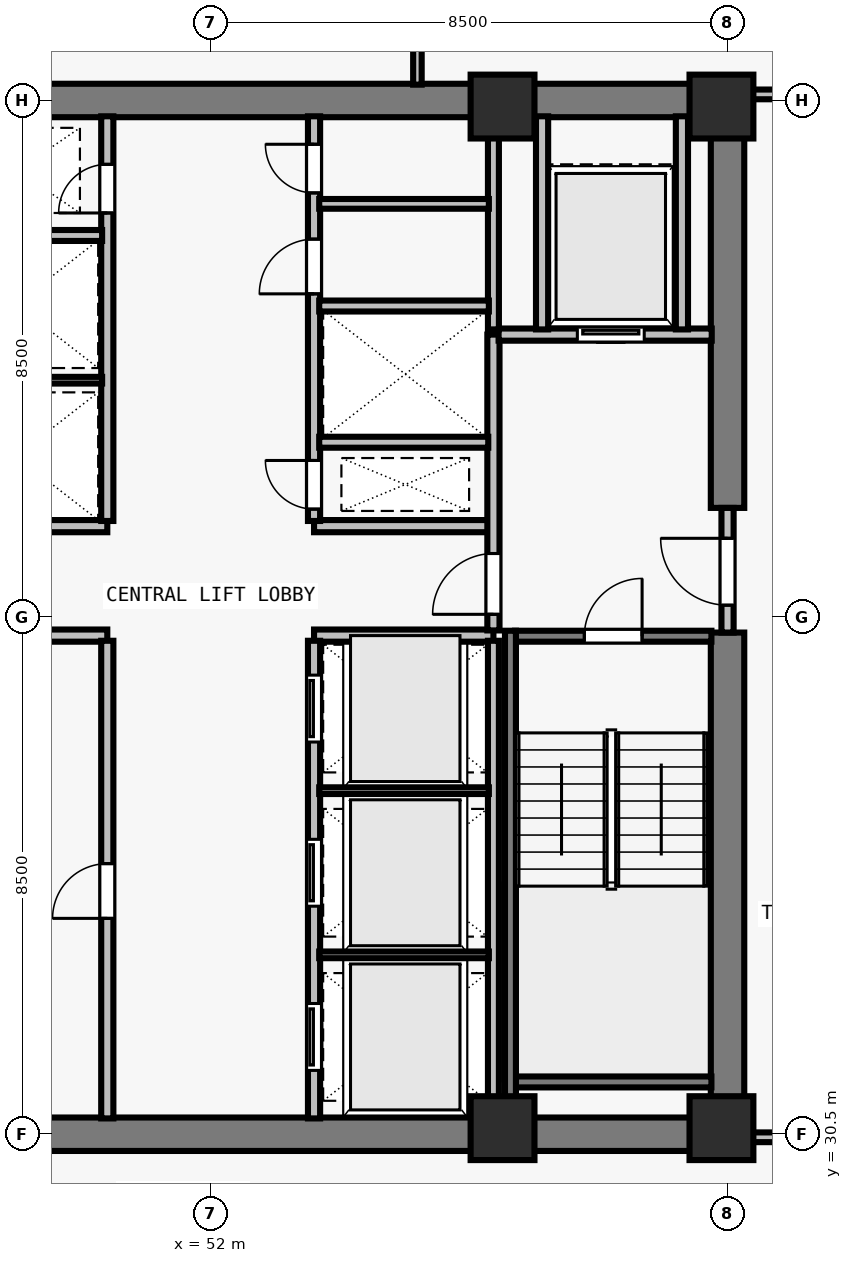
"""IFC4 building model, lengths in metres.
Left out: names, types, materials, properties, quantities, classifications, styles, units other than length and angle.
Written with IfcOpenShell. Run it as: python <this file> out.ifc"""

import sys

from ifc_helpers import new_model, si_unit, direction, frame, frame_2d, origin, origin_2d, place, context, subcontext, project, spatial, rectangle, extrude, element, fill, save


model = new_model("IFC4")
c1 = context("Model", 3, precision=1e-05, world=origin(), true_north=direction((0.0, 1.0)))
c2 = subcontext(c1, "Body", "Model", "MODEL_VIEW")
j1 = project(units=[si_unit("LENGTHUNIT", "METRE"), si_unit("PLANEANGLEUNIT", "RADIAN")], contexts=[c1])
p1 = place(None, origin())
s1 = spatial("IfcSite", under=j1, at=p1, CompositionType="ELEMENT")
p2 = place(p1, origin())
s2 = spatial("IfcBuilding", under=s1, at=p2, CompositionType="ELEMENT")
p3 = place(p2, frame((0.0, 0.0, 176.0)))
s3 = spatial("IfcBuildingStorey", under=s2, at=p3, CompositionType="ELEMENT", Elevation=176.0)
for number, where, z_axis, x_axis in (
    (1, (56.8, 30.6, 0.0), (0.0, 0.0, 1.0), (1.0, 0.0, 0.0)),
    (2, (60.4, 30.6, 0.0), (0.0, 0.0, 1.0), (1.0, 0.0, 0.0)),
    (3, (56.8, 47.4, 0.0), (0.0, 0.0, 1.0), (1.0, 0.0, 0.0)),
    (4, (60.4, 47.4, 0.0), (0.0, 0.0, 1.0), (1.0, 0.0, 0.0)),
):
    element("IfcColumn", number, at=place(p3, frame(where, z_axis=z_axis, x_axis=x_axis)), inside=s3, PredefinedType="COLUMN", context=c2, shape_type="SweptSolid", body=[
        extrude(rectangle(XDim=1.05, YDim=1.05, at=origin_2d()), origin(), (0.0, 0.0, 1.0), 3.5),
    ])
for number, where, z_axis, x_axis in (
    (5, (43.225, 30.5, 0.0), (0.0, 0.0, 1.0), (1.0, 0.0, 0.0)),
    (6, (43.225, 47.5, 0.0), (0.0, 0.0, 1.0), (1.0, 0.0, 0.0)),
):
    element("IfcWall", number, at=place(p3, frame(where, z_axis=z_axis, x_axis=x_axis)), inside=s3, PredefinedType="SHEAR", context=c2, shape_type="SweptSolid", body=[
        extrude(rectangle(XDim=17.55, YDim=0.55, at=frame_2d((8.775, 0.0))), origin(), (0.0, 0.0, 1.0), 3.28),
    ])
p4 = place(p3, frame((60.5, 30.765, 0.0), z_axis=(0.0, 0.0, 1.0), x_axis=(0.0, 1.0, 0.0)))
e7 = element("IfcWall", 7, at=p4, inside=s3, PredefinedType="SHEAR", context=c2, shape_type="SweptSolid", body=[
    extrude(rectangle(XDim=7.985, YDim=0.55, at=frame_2d((3.993, 0.0))), origin(), (0.0, 0.0, 1.0), 3.28),
])
p5 = place(p3, frame((60.5, 40.8, 0.0), z_axis=(0.0, 0.0, 1.0), x_axis=(0.0, 1.0, 0.0)))
e8 = element("IfcWall", 8, at=p5, inside=s3, PredefinedType="SHEAR", context=c2, shape_type="SweptSolid", body=[
    extrude(rectangle(XDim=6.435, YDim=0.55, at=frame_2d((3.218, 0.0))), origin(), (0.0, 0.0, 1.0), 3.28),
])
for number, where, z_axis, x_axis in (
    (9, (47.35, 38.7, 0.0), (0.0, 0.0, 1.0), (1.0, 0.0, 0.0)),
    (10, (47.35, 40.5, 0.0), (0.0, 0.0, 1.0), (1.0, 0.0, 0.0)),
    (11, (53.7, 38.7, 0.0), (0.0, 0.0, 1.0), (1.0, 0.0, 0.0)),
    (12, (53.7, 40.5, 0.0), (0.0, 0.0, 1.0), (1.0, 0.0, 0.0)),
):
    element("IfcWall", number, at=place(p3, frame(where, z_axis=z_axis, x_axis=x_axis)), inside=s3, PredefinedType="SOLIDWALL", context=c2, shape_type="SweptSolid", body=[
        extrude(rectangle(XDim=2.95, YDim=0.2, at=frame_2d((1.475, 0.0))), origin(), (0.0, 0.0, 1.0), 3.28),
    ])
p6 = place(p3, frame((50.3, 30.76, 0.0), z_axis=(0.0, 0.0, 1.0), x_axis=(0.0, 1.0, 0.0)))
e13 = element("IfcWall", 13, at=p6, inside=s3, PredefinedType="SOLIDWALL", context=c2, shape_type="SweptSolid", body=[
    extrude(rectangle(XDim=7.855, YDim=0.2, at=frame_2d((3.927, 0.0))), origin(), (0.0, 0.0, 1.0), 3.28),
])
p7 = place(p6, frame((3.29, 0.0, 0.0)))
e14 = element("IfcOpeningElement", 14, at=p7, cuts=e13, PredefinedType="OPENING", context=c2, shape_type="SweptSolid", body=[
    extrude(rectangle(XDim=0.9, YDim=2.12, at=frame_2d((0.45, 1.06))), frame((0.0, 0.11, 0.0), z_axis=(0.0, -1.0, 0.0), x_axis=(1.0, 0.0, 0.0)), (0.0, 0.0, 1.0), 0.22),
])
p8 = place(p3, frame((53.7, 30.76, 0.0), z_axis=(0.0, 0.0, 1.0), x_axis=(0.0, 1.0, 0.0)))
e15 = element("IfcWall", 15, at=p8, inside=s3, PredefinedType="SOLIDWALL", context=c2, shape_type="SweptSolid", body=[
    extrude(rectangle(XDim=7.855, YDim=0.2, at=frame_2d((3.927, 0.0))), origin(), (0.0, 0.0, 1.0), 3.28),
])
p9 = place(p8, frame((0.79, 0.0, 0.0)))
e16 = element("IfcOpeningElement", 16, at=p9, cuts=e15, PredefinedType="OPENING", context=c2, shape_type="SweptSolid", body=[
    extrude(rectangle(XDim=1.1, YDim=2.2, at=frame_2d((0.55, 1.1))), frame((0.0, 0.11, 0.0), z_axis=(0.0, -1.0, 0.0), x_axis=(1.0, 0.0, 0.0)), (0.0, 0.0, 1.0), 0.22),
])
p10 = place(p8, frame((3.49, 0.0, 0.0)))
e17 = element("IfcOpeningElement", 17, at=p10, cuts=e15, PredefinedType="OPENING", context=c2, shape_type="SweptSolid", body=[
    extrude(rectangle(XDim=1.1, YDim=2.2, at=frame_2d((0.55, 1.1))), frame((0.0, 0.11, 0.0), z_axis=(0.0, -1.0, 0.0), x_axis=(1.0, 0.0, 0.0)), (0.0, 0.0, 1.0), 0.22),
])
p11 = place(p8, frame((6.19, 0.0, 0.0)))
e18 = element("IfcOpeningElement", 18, at=p11, cuts=e15, PredefinedType="OPENING", context=c2, shape_type="SweptSolid", body=[
    extrude(rectangle(XDim=1.1, YDim=2.2, at=frame_2d((0.55, 1.1))), frame((0.0, 0.11, 0.0), z_axis=(0.0, -1.0, 0.0), x_axis=(1.0, 0.0, 0.0)), (0.0, 0.0, 1.0), 0.22),
])
p12 = place(p3, frame((50.3, 40.585, 0.0), z_axis=(0.0, 0.0, 1.0), x_axis=(0.0, 1.0, 0.0)))
e19 = element("IfcWall", 19, at=p12, inside=s3, PredefinedType="SOLIDWALL", context=c2, shape_type="SweptSolid", body=[
    extrude(rectangle(XDim=6.655, YDim=0.2, at=frame_2d((3.328, 0.0))), origin(), (0.0, 0.0, 1.0), 3.28),
])
p13 = place(p12, frame((5.065, 0.0, 0.0)))
e20 = element("IfcOpeningElement", 20, at=p13, cuts=e19, PredefinedType="OPENING", context=c2, shape_type="SweptSolid", body=[
    extrude(rectangle(XDim=0.8, YDim=2.08, at=frame_2d((0.4, 1.04))), frame((0.0, 0.11, 0.0), z_axis=(0.0, -1.0, 0.0), x_axis=(1.0, 0.0, 0.0)), (0.0, 0.0, 1.0), 0.22),
])
p14 = place(p3, frame((53.7, 40.585, 0.0), z_axis=(0.0, 0.0, 1.0), x_axis=(0.0, 1.0, 0.0)))
e21 = element("IfcWall", 21, at=p14, inside=s3, PredefinedType="SOLIDWALL", context=c2, shape_type="SweptSolid", body=[
    extrude(rectangle(XDim=6.655, YDim=0.2, at=frame_2d((3.328, 0.0))), origin(), (0.0, 0.0, 1.0), 3.28),
])
p15 = place(p14, frame((0.195, 0.0, 0.0)))
e22 = element("IfcOpeningElement", 22, at=p15, cuts=e21, PredefinedType="OPENING", context=c2, shape_type="SweptSolid", body=[
    extrude(rectangle(XDim=0.8, YDim=2.08, at=frame_2d((0.4, 1.04))), frame((0.0, 0.11, 0.0), z_axis=(0.0, -1.0, 0.0), x_axis=(1.0, 0.0, 0.0)), (0.0, 0.0, 1.0), 0.22),
])
p16 = place(p14, frame((3.735, 0.0, 0.0)))
e23 = element("IfcOpeningElement", 23, at=p16, cuts=e21, PredefinedType="OPENING", context=c2, shape_type="SweptSolid", body=[
    extrude(rectangle(XDim=0.9, YDim=2.12, at=frame_2d((0.45, 1.06))), frame((0.0, 0.11, 0.0), z_axis=(0.0, -1.0, 0.0), x_axis=(1.0, 0.0, 0.0)), (0.0, 0.0, 1.0), 0.22),
])
p17 = place(p14, frame((5.395, 0.0, 0.0)))
e24 = element("IfcOpeningElement", 24, at=p17, cuts=e21, PredefinedType="OPENING", context=c2, shape_type="SweptSolid", body=[
    extrude(rectangle(XDim=0.8, YDim=2.1, at=frame_2d((0.4, 1.05))), frame((0.0, 0.11, 0.0), z_axis=(0.0, -1.0, 0.0), x_axis=(1.0, 0.0, 0.0)), (0.0, 0.0, 1.0), 0.22),
])
p18 = place(p3, frame((60.5, 38.75, 0.0), z_axis=(0.0, 0.0, 1.0), x_axis=(0.0, 1.0, 0.0)))
e25 = element("IfcWall", 25, at=p18, inside=s3, PredefinedType="SOLIDWALL", context=c2, shape_type="SweptSolid", body=[
    extrude(rectangle(XDim=2.05, YDim=0.2, at=frame_2d((1.025, 0.0))), origin(), (0.0, 0.0, 1.0), 3.28),
])
p19 = place(p18, frame((0.45, 0.0, 0.0)))
e26 = element("IfcOpeningElement", 26, at=p19, cuts=e25, PredefinedType="OPENING", context=c2, shape_type="SweptSolid", body=[
    extrude(rectangle(XDim=1.1, YDim=2.15, at=frame_2d((0.55, 1.075))), frame((0.0, 0.11, 0.0), z_axis=(0.0, -1.0, 0.0), x_axis=(1.0, 0.0, 0.0)), (0.0, 0.0, 1.0), 0.22),
])
p20 = place(p3, frame((56.65, 38.785, 0.0), z_axis=(0.0, 0.0, 1.0), x_axis=(0.0, 1.0, 0.0)))
e27 = element("IfcWall", 27, at=p20, inside=s3, PredefinedType="SOLIDWALL", context=c2, shape_type="SweptSolid", body=[
    extrude(rectangle(XDim=4.865, YDim=0.2, at=frame_2d((2.433, 0.0))), origin(), (0.0, 0.0, 1.0), 3.28),
])
p21 = place(p20, frame((0.265, 0.0, 0.0)))
e28 = element("IfcOpeningElement", 28, at=p21, cuts=e27, PredefinedType="OPENING", context=c2, shape_type="SweptSolid", body=[
    extrude(rectangle(XDim=1.0, YDim=2.15, at=frame_2d((0.5, 1.075))), frame((0.0, 0.11, 0.0), z_axis=(0.0, -1.0, 0.0), x_axis=(1.0, 0.0, 0.0)), (0.0, 0.0, 1.0), 0.22),
])
p22 = place(p3, frame((56.735, 43.65, 0.0), z_axis=(0.0, 0.0, 1.0), x_axis=(1.0, 0.0, 0.0)))
e29 = element("IfcWall", 29, at=p22, inside=s3, PredefinedType="SOLIDWALL", context=c2, shape_type="SweptSolid", body=[
    extrude(rectangle(XDim=3.505, YDim=0.2, at=frame_2d((1.752, 0.0))), origin(), (0.0, 0.0, 1.0), 3.28),
])
p23 = place(p22, frame((1.295, 0.0, 0.0)))
e30 = element("IfcOpeningElement", 30, at=p23, cuts=e29, PredefinedType="OPENING", context=c2, shape_type="SweptSolid", body=[
    extrude(rectangle(XDim=1.1, YDim=2.2, at=frame_2d((0.55, 1.1))), frame((0.0, 0.11, 0.0), z_axis=(0.0, -1.0, 0.0), x_axis=(1.0, 0.0, 0.0)), (0.0, 0.0, 1.0), 0.22),
])
for number, where, z_axis, x_axis in (
    (31, (57.45, 43.735, 0.0), (0.0, 0.0, 1.0), (0.0, 1.0, 0.0)),
    (32, (59.75, 43.735, 0.0), (0.0, 0.0, 1.0), (0.0, 1.0, 0.0)),
):
    element("IfcWall", number, at=place(p3, frame(where, z_axis=z_axis, x_axis=x_axis)), inside=s3, PredefinedType="SOLIDWALL", context=c2, shape_type="SweptSolid", body=[
        extrude(rectangle(XDim=3.505, YDim=0.2, at=frame_2d((1.752, 0.0))), origin(), (0.0, 0.0, 1.0), 3.28),
    ])
p24 = place(p3, frame((56.65, 30.76, 0.0), z_axis=(0.0, 0.0, 1.0), x_axis=(0.0, 1.0, 0.0)))
e33 = element("IfcWall", 33, at=p24, inside=s3, PredefinedType="SOLIDWALL", context=c2, shape_type="SweptSolid", body=[
    extrude(rectangle(XDim=7.855, YDim=0.18, at=frame_2d((3.927, 0.0))), origin(), (0.0, 0.0, 1.0), 3.28),
])
for number, where, z_axis, x_axis in (
    (34, (53.785, 33.45, 0.0), (0.0, 0.0, 1.0), (1.0, 0.0, 0.0)),
    (35, (53.785, 36.15, 0.0), (0.0, 0.0, 1.0), (1.0, 0.0, 0.0)),
):
    element("IfcWall", number, at=place(p3, frame(where, z_axis=z_axis, x_axis=x_axis)), inside=s3, PredefinedType="PARTITIONING", context=c2, shape_type="SweptSolid", body=[
        extrude(rectangle(XDim=2.79, YDim=0.11, at=frame_2d((1.395, 0.0))), origin(), (0.0, 0.0, 1.0), 3.28),
    ])
p25 = place(p3, frame((47.435, 42.9, 0.0), z_axis=(0.0, 0.0, 1.0), x_axis=(1.0, 0.0, 0.0)))
e36 = element("IfcWall", 36, at=p25, inside=s3, PredefinedType="PARTITIONING", context=c2, shape_type="SweptSolid", body=[
    extrude(rectangle(XDim=2.78, YDim=0.11, at=frame_2d((1.39, 0.0))), origin(), (0.0, 0.0, 1.0), 3.28),
])
p26 = place(p3, frame((47.425, 45.28, 0.0), z_axis=(0.0, 0.0, 1.0), x_axis=(1.0, 0.0, 0.0)))
e37 = element("IfcWall", 37, at=p26, inside=s3, PredefinedType="SOLIDWALL", context=c2, shape_type="SweptSolid", body=[
    extrude(rectangle(XDim=2.79, YDim=0.18, at=frame_2d((1.395, 0.0))), origin(), (0.0, 0.0, 1.0), 3.28),
])
p27 = place(p3, frame((56.65, 43.735, 0.0), z_axis=(0.0, 0.0, 1.0), x_axis=(0.0, 1.0, 0.0)))
e38 = element("IfcWall", 38, at=p27, inside=s3, PredefinedType="SOLIDWALL", context=c2, shape_type="SweptSolid", body=[
    extrude(rectangle(XDim=3.505, YDim=0.18, at=frame_2d((1.752, 0.0))), origin(), (0.0, 0.0, 1.0), 3.28),
])
p28 = place(p3, frame((53.785, 41.88, 0.0), z_axis=(0.0, 0.0, 1.0), x_axis=(1.0, 0.0, 0.0)))
e39 = element("IfcWall", 39, at=p28, inside=s3, PredefinedType="SOLIDWALL", context=c2, shape_type="SweptSolid", body=[
    extrude(rectangle(XDim=2.78, YDim=0.18, at=frame_2d((1.39, 0.0))), origin(), (0.0, 0.0, 1.0), 3.28),
])
p29 = place(p3, frame((53.785, 44.12, 0.0), z_axis=(0.0, 0.0, 1.0), x_axis=(1.0, 0.0, 0.0)))
e40 = element("IfcWall", 40, at=p29, inside=s3, PredefinedType="SOLIDWALL", context=c2, shape_type="SweptSolid", body=[
    extrude(rectangle(XDim=2.79, YDim=0.18, at=frame_2d((1.395, 0.0))), origin(), (0.0, 0.0, 1.0), 3.28),
])
p30 = place(p3, frame((53.785, 45.8, 0.0), z_axis=(0.0, 0.0, 1.0), x_axis=(1.0, 0.0, 0.0)))
e41 = element("IfcWall", 41, at=p30, inside=s3, PredefinedType="PARTITIONING", context=c2, shape_type="SweptSolid", body=[
    extrude(rectangle(XDim=2.79, YDim=0.16, at=frame_2d((1.395, 0.0))), origin(), (0.0, 0.0, 1.0), 3.28),
])
p31 = place(p3, frame((60.765, 30.45, 0.0), z_axis=(0.0, 0.0, 1.0), x_axis=(1.0, 0.0, 0.0)))
e42 = element("IfcWall", 42, at=p31, inside=s3, PredefinedType="PARTITIONING", context=c2, shape_type="SweptSolid", body=[
    extrude(rectangle(XDim=3.235, YDim=0.16, at=frame_2d((1.618, 0.0))), origin(), (0.0, 0.0, 1.0), 3.28),
])
p32 = place(p3, frame((60.765, 47.6, 0.0), z_axis=(0.0, 0.0, 1.0), x_axis=(1.0, 0.0, 0.0)))
e43 = element("IfcWall", 43, at=p32, inside=s3, PredefinedType="PARTITIONING", context=c2, shape_type="SweptSolid", body=[
    extrude(rectangle(XDim=3.17, YDim=0.16, at=frame_2d((1.585, 0.0))), origin(), (0.0, 0.0, 1.0), 3.28),
])
p33 = place(p3, frame((55.4, 47.76, 0.0), z_axis=(0.0, 0.0, 1.0), x_axis=(0.0, 1.0, 0.0)))
e44 = element("IfcWall", 44, at=p33, inside=s3, PredefinedType="PARTITIONING", context=c2, shape_type="SweptSolid", body=[
    extrude(rectangle(XDim=14.915, YDim=0.14, at=frame_2d((7.458, 0.0))), origin(), (0.0, 0.0, 1.0), 2.896),
])
p34 = place(p3, frame((57.005, 38.69, 0.0), z_axis=(0.0, 0.0, 1.0), x_axis=(1.0, 0.0, 0.0)))
e45 = element("IfcWall", 45, at=p34, inside=s3, PredefinedType="SOLIDWALL", context=c2, shape_type="SweptSolid", body=[
    extrude(rectangle(XDim=3.23, YDim=0.18, at=frame_2d((1.615, 0.0))), origin(), (0.0, 0.0, 1.0), 3.28),
])
p35 = place(p34, frame((1.14, 0.0, 0.0)))
e46 = element("IfcOpeningElement", 46, at=p35, cuts=e45, PredefinedType="OPENING", context=c2, shape_type="SweptSolid", body=[
    extrude(rectangle(XDim=0.95, YDim=2.15, at=frame_2d((0.475, 1.075))), frame((0.0, 0.1, 0.0), z_axis=(0.0, -1.0, 0.0), x_axis=(1.0, 0.0, 0.0)), (0.0, 0.0, 1.0), 0.2),
])
p36 = place(p3, frame((57.005, 31.36, 0.0), z_axis=(0.0, 0.0, 1.0), x_axis=(1.0, 0.0, 0.0)))
e47 = element("IfcWall", 47, at=p36, inside=s3, PredefinedType="SOLIDWALL", context=c2, shape_type="SweptSolid", body=[
    extrude(rectangle(XDim=3.23, YDim=0.18, at=frame_2d((1.615, 0.0))), origin(), (0.0, 0.0, 1.0), 3.28),
])
p37 = place(p3, frame((56.93, 38.78, 0.0), z_axis=(0.0, 0.0, 1.0), x_axis=(0.0, -1.0, 0.0)))
e48 = element("IfcWall", 48, at=p37, inside=s3, PredefinedType="SOLIDWALL", context=c2, shape_type="SweptSolid", body=[
    extrude(rectangle(XDim=8.017, YDim=0.18, at=frame_2d((4.009, 0.0))), origin(), (0.0, 0.0, 1.0), 3.28),
])
p38 = place(p19, origin())
e49 = element("IfcDoor", 49, at=p38, inside=s3, OperationType="SINGLE_SWING_RIGHT", PredefinedType="DOOR", context=c2, shape_type="SweptSolid", body=[
    extrude(rectangle(XDim=1.1, YDim=2.15, at=frame_2d((0.55, 1.075))), frame((0.0, 0.025, 0.0), z_axis=(0.0, -1.0, 0.0), x_axis=(1.0, 0.0, 0.0)), (0.0, 0.0, 1.0), 0.05),
])
fill(e26, e49)
p39 = place(p21, origin())
e50 = element("IfcDoor", 50, at=p39, inside=s3, OperationType="SINGLE_SWING_LEFT", PredefinedType="DOOR", context=c2, shape_type="SweptSolid", body=[
    extrude(rectangle(XDim=1.0, YDim=2.15, at=frame_2d((0.5, 1.075))), frame((0.0, 0.025, 0.0), z_axis=(0.0, -1.0, 0.0), x_axis=(1.0, 0.0, 0.0)), (0.0, 0.0, 1.0), 0.05),
])
fill(e28, e50)
p40 = place(p23, origin())
e51 = element("IfcDoor", 51, at=p40, inside=s3, OperationType="SLIDING_TO_LEFT", PredefinedType="DOOR", context=c2, shape_type="SweptSolid", body=[
    extrude(rectangle(XDim=1.1, YDim=2.2, at=frame_2d((0.55, 1.1))), frame((0.0, 0.025, 0.0), z_axis=(0.0, -1.0, 0.0), x_axis=(1.0, 0.0, 0.0)), (0.0, 0.0, 1.0), 0.05),
])
fill(e30, e51)
p41 = place(p7, origin())
e52 = element("IfcDoor", 52, at=p41, inside=s3, OperationType="SINGLE_SWING_LEFT", PredefinedType="DOOR", context=c2, shape_type="SweptSolid", body=[
    extrude(rectangle(XDim=0.9, YDim=2.12, at=frame_2d((0.45, 1.06))), frame((0.0, 0.025, 0.0), z_axis=(0.0, -1.0, 0.0), x_axis=(1.0, 0.0, 0.0)), (0.0, 0.0, 1.0), 0.05),
])
fill(e14, e52)
p42 = place(p9, origin())
e53 = element("IfcDoor", 53, at=p42, inside=s3, OperationType="SLIDING_TO_LEFT", PredefinedType="DOOR", context=c2, shape_type="SweptSolid", body=[
    extrude(rectangle(XDim=1.1, YDim=2.2, at=frame_2d((0.55, 1.1))), frame((0.0, 0.025, 0.0), z_axis=(0.0, -1.0, 0.0), x_axis=(1.0, 0.0, 0.0)), (0.0, 0.0, 1.0), 0.05),
])
fill(e16, e53)
p43 = place(p10, origin())
e54 = element("IfcDoor", 54, at=p43, inside=s3, OperationType="SLIDING_TO_LEFT", PredefinedType="DOOR", context=c2, shape_type="SweptSolid", body=[
    extrude(rectangle(XDim=1.1, YDim=2.2, at=frame_2d((0.55, 1.1))), frame((0.0, 0.025, 0.0), z_axis=(0.0, -1.0, 0.0), x_axis=(1.0, 0.0, 0.0)), (0.0, 0.0, 1.0), 0.05),
])
fill(e17, e54)
p44 = place(p11, origin())
e55 = element("IfcDoor", 55, at=p44, inside=s3, OperationType="SLIDING_TO_LEFT", PredefinedType="DOOR", context=c2, shape_type="SweptSolid", body=[
    extrude(rectangle(XDim=1.1, YDim=2.2, at=frame_2d((0.55, 1.1))), frame((0.0, 0.025, 0.0), z_axis=(0.0, -1.0, 0.0), x_axis=(1.0, 0.0, 0.0)), (0.0, 0.0, 1.0), 0.05),
])
fill(e18, e55)
p45 = place(p13, origin())
e56 = element("IfcDoor", 56, at=p45, inside=s3, OperationType="SINGLE_SWING_LEFT", PredefinedType="DOOR", context=c2, shape_type="SweptSolid", body=[
    extrude(rectangle(XDim=0.8, YDim=2.08, at=frame_2d((0.4, 1.04))), frame((0.0, 0.025, 0.0), z_axis=(0.0, -1.0, 0.0), x_axis=(1.0, 0.0, 0.0)), (0.0, 0.0, 1.0), 0.05),
])
fill(e20, e56)
p46 = place(p15, origin())
e57 = element("IfcDoor", 57, at=p46, inside=s3, OperationType="SINGLE_SWING_RIGHT", PredefinedType="DOOR", context=c2, shape_type="SweptSolid", body=[
    extrude(rectangle(XDim=0.8, YDim=2.08, at=frame_2d((0.4, 1.04))), frame((0.0, 0.025, 0.0), z_axis=(0.0, -1.0, 0.0), x_axis=(1.0, 0.0, 0.0)), (0.0, 0.0, 1.0), 0.05),
])
fill(e22, e57)
p47 = place(p16, origin())
e58 = element("IfcDoor", 58, at=p47, inside=s3, OperationType="SINGLE_SWING_LEFT", PredefinedType="DOOR", context=c2, shape_type="SweptSolid", body=[
    extrude(rectangle(XDim=0.9, YDim=2.12, at=frame_2d((0.45, 1.06))), frame((0.0, 0.025, 0.0), z_axis=(0.0, -1.0, 0.0), x_axis=(1.0, 0.0, 0.0)), (0.0, 0.0, 1.0), 0.05),
])
fill(e23, e58)
p48 = place(p17, origin())
e59 = element("IfcDoor", 59, at=p48, inside=s3, OperationType="SINGLE_SWING_RIGHT", PredefinedType="DOOR", context=c2, shape_type="SweptSolid", body=[
    extrude(rectangle(XDim=0.8, YDim=2.1, at=frame_2d((0.4, 1.05))), frame((0.0, 0.025, 0.0), z_axis=(0.0, -1.0, 0.0), x_axis=(1.0, 0.0, 0.0)), (0.0, 0.0, 1.0), 0.05),
])
fill(e24, e59)
p49 = place(p35, origin())
e60 = element("IfcDoor", 60, at=p49, inside=s3, OperationType="SINGLE_SWING_RIGHT", PredefinedType="DOOR", context=c2, shape_type="SweptSolid", body=[
    extrude(rectangle(XDim=0.95, YDim=2.15, at=frame_2d((0.475, 1.075))), frame((0.0, 0.025, 0.0), z_axis=(0.0, -1.0, 0.0), x_axis=(1.0, 0.0, 0.0)), (0.0, 0.0, 1.0), 0.05),
])
fill(e46, e60)
save(model, sys.argv[1])
